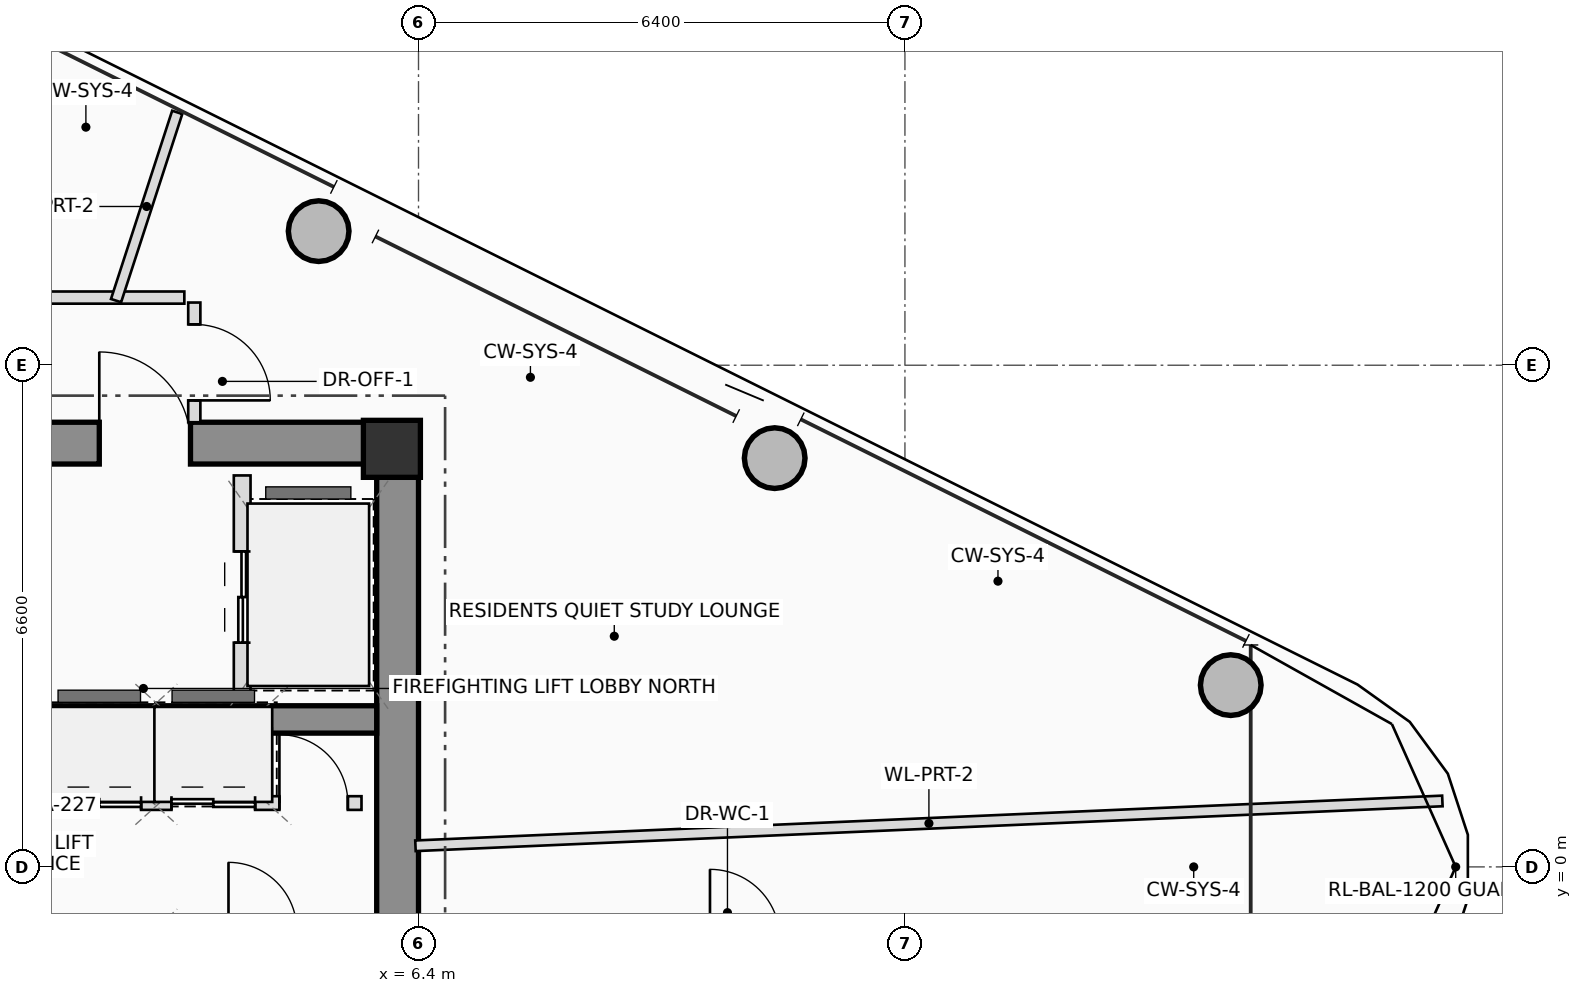
"""IFC4 building model, lengths in metres.
Left out: names, types, materials, properties, quantities, classifications, styles, units other than length and angle.
Written with IfcOpenShell. Run it as: python <this file> out.ifc"""

import sys

from ifc_helpers import new_model, si_unit, direction, frame, frame_2d, origin, origin_2d, place, context, subcontext, project, spatial, rectangle, hollow_circle, extrude, source, transform, mapped, element, fill, save


model = new_model("IFC4")
c1 = context("Model", 3, precision=1e-05, world=origin(), true_north=direction((0.0, 1.0)))
c2 = subcontext(c1, "Body", "Model", "MODEL_VIEW")
j1 = project(units=[si_unit("LENGTHUNIT", "METRE"), si_unit("PLANEANGLEUNIT", "RADIAN")], contexts=[c1])
p1 = place(None, origin())
s1 = spatial("IfcSite", under=j1, at=p1, CompositionType="ELEMENT")
p2 = place(p1, origin())
s2 = spatial("IfcBuilding", under=s1, at=p2, CompositionType="ELEMENT")
p3 = place(p2, frame((0.0, 0.0, 307.1)))
s3 = spatial("IfcBuildingStorey", under=s2, at=p3, CompositionType="ELEMENT", Elevation=307.1)
m1 = source(origin(), c2, "Body", "SweptSolid", [
    extrude(rectangle(XDim=0.75, YDim=0.75, at=origin_2d()), origin(), (0.0, 0.0, 1.0), 3.45),
])
p4 = place(p3, frame((6.05, 5.5, 0.0), z_axis=(0.0, 0.0, 1.0), x_axis=(1.0, 0.0, 0.0)))
e1 = element("IfcColumn", 1, at=p4, inside=s3, PredefinedType="COLUMN", context=c2, shape_type="MappedRepresentation", body=[
    mapped(m1, transform((0.0, 0.0, 0.0), scale=1.0)),
])
p5 = place(p3, frame((-6.4, 5.575, 0.0), z_axis=(0.0, 0.0, 1.0), x_axis=(1.0, 0.0, 0.0)))
e2 = element("IfcWall", 2, at=p5, inside=s3, PredefinedType="SHEAR", context=c2, shape_type="SweptSolid", body=[
    extrude(rectangle(XDim=12.8, YDim=0.55, at=frame_2d((6.4, 0.0))), origin(), (0.0, 0.0, 1.0), 3.45),
])
p6 = place(p5, frame((8.6, 0.0, 0.0)))
e3 = element("IfcOpeningElement", 3, at=p6, cuts=e2, PredefinedType="OPENING", context=c2, shape_type="SweptSolid", body=[
    extrude(rectangle(XDim=1.2, YDim=2.2, at=frame_2d((0.6, 1.1))), frame((0.0, 0.285, 0.0), z_axis=(0.0, -1.0, 0.0), x_axis=(1.0, 0.0, 0.0)), (0.0, 0.0, 1.0), 0.57),
])
p7 = place(p3, frame((6.125, -5.3, 0.0), z_axis=(0.0, 0.0, 1.0), x_axis=(0.0, 1.0, 0.0)))
e4 = element("IfcWall", 4, at=p7, inside=s3, PredefinedType="SHEAR", context=c2, shape_type="SweptSolid", body=[
    extrude(rectangle(XDim=10.6, YDim=0.55, at=frame_2d((5.3, 0.0))), origin(), (0.0, 0.0, 1.0), 3.45),
])
p8 = place(p3, frame((-5.85, 1.94, 0.0), z_axis=(0.0, 0.0, 1.0), x_axis=(1.0, 0.0, 0.0)))
e5 = element("IfcWall", 5, at=p8, inside=s3, PredefinedType="SHEAR", context=c2, shape_type="SweptSolid", body=[
    extrude(rectangle(XDim=11.7, YDim=0.36, at=frame_2d((5.85, 0.0))), origin(), (0.0, 0.0, 1.0), 3.45),
])
m2 = source(origin(), c2, "Body", "SweptSolid", [
    extrude(hollow_circle(Radius=0.4, WallThickness=0.028, at=origin_2d()), origin(), (0.0, 0.0, 1.0), 3.45),
])
for number, where, z_axis, x_axis in (
    (6, (17.087, 2.392, 0.0), (0.0, 0.0, 1.0), (1.0, 0.0, 0.0)),
    (7, (11.086, 5.378, 0.0), (0.0, 0.0, 1.0), (1.0, 0.0, 0.0)),
    (8, (5.086, 8.364, 0.0), (0.0, 0.0, 1.0), (1.0, 0.0, 0.0)),
):
    element("IfcColumn", number, at=place(p3, frame(where, z_axis=z_axis, x_axis=x_axis)), inside=s3, PredefinedType="COLUMN", context=c2, shape_type="MappedRepresentation", body=[
        mapped(m2, transform((0.0, 0.0, 0.0), scale=1.0)),
    ])
p9 = place(p3, frame((4.08, 2.2, 0.0), z_axis=(0.0, 0.0, 1.0), x_axis=(0.0, 1.0, 0.0)))
e9 = element("IfcWall", 9, at=p9, inside=s3, PredefinedType="PLUMBINGWALL", context=c2, shape_type="SweptSolid", body=[
    extrude(rectangle(XDim=2.95, YDim=0.22, at=frame_2d((1.475, 0.0))), origin(), (0.0, 0.0, 1.0), 3.25),
])
p10 = place(p9, frame((0.75, 0.0, 0.0)))
e10 = element("IfcOpeningElement", 10, at=p10, cuts=e9, PredefinedType="OPENING", context=c2, shape_type="SweptSolid", body=[
    extrude(rectangle(XDim=1.2, YDim=2.25, at=frame_2d((0.6, 1.125))), frame((0.0, 0.12, 0.0), z_axis=(0.0, -1.0, 0.0), x_axis=(1.0, 0.0, 0.0)), (0.0, 0.0, 1.0), 0.24),
])
for number, where, z_axis, x_axis in (
    (11, (3.02, 0.84, 0.0), (0.0, 0.0, 1.0), (0.0, 1.0, 0.0)),
    (12, (4.38, 0.84, 0.0), (0.0, 0.0, 1.0), (0.0, 1.0, 0.0)),
):
    element("IfcWall", number, at=place(p3, frame(where, z_axis=z_axis, x_axis=x_axis)), inside=s3, PredefinedType="PLUMBINGWALL", context=c2, shape_type="SweptSolid", body=[
        extrude(rectangle(XDim=0.98, YDim=0.18, at=frame_2d((0.49, 0.0))), origin(), (0.0, 0.0, 1.0), 3.25),
    ])
p11 = place(p3, frame((-5.68, 0.84, 0.0), z_axis=(0.0, 0.0, 1.0), x_axis=(1.0, 0.0, 0.0)))
e13 = element("IfcWall", 13, at=p11, inside=s3, PredefinedType="PLUMBINGWALL", context=c2, shape_type="SweptSolid", body=[
    extrude(rectangle(XDim=11.33, YDim=0.18, at=frame_2d((5.665, 0.0))), origin(), (0.0, 0.0, 1.0), 3.25),
])
p12 = place(p11, frame((3.13, 0.0, 0.0)))
e14 = element("IfcOpeningElement", 14, at=p12, cuts=e13, PredefinedType="OPENING", context=c2, shape_type="SweptSolid", body=[
    extrude(rectangle(XDim=0.9, YDim=2.05, at=frame_2d((0.45, 1.025))), frame((0.0, 0.1, 0.0), z_axis=(0.0, -1.0, 0.0), x_axis=(1.0, 0.0, 0.0)), (0.0, 0.0, 1.0), 0.2),
])
p13 = place(p11, frame((7.33, 0.0, 0.0)))
e15 = element("IfcOpeningElement", 15, at=p13, cuts=e13, PredefinedType="OPENING", context=c2, shape_type="SweptSolid", body=[
    extrude(rectangle(XDim=1.1, YDim=2.2, at=frame_2d((0.55, 1.1))), frame((0.0, 0.1, 0.0), z_axis=(0.0, -1.0, 0.0), x_axis=(1.0, 0.0, 0.0)), (0.0, 0.0, 1.0), 0.2),
])
p14 = place(p11, frame((8.83, 0.0, 0.0)))
e16 = element("IfcOpeningElement", 16, at=p14, cuts=e13, PredefinedType="OPENING", context=c2, shape_type="SweptSolid", body=[
    extrude(rectangle(XDim=1.1, YDim=2.2, at=frame_2d((0.55, 1.1))), frame((0.0, 0.1, 0.0), z_axis=(0.0, -1.0, 0.0), x_axis=(1.0, 0.0, 0.0)), (0.0, 0.0, 1.0), 0.2),
])
p15 = place(p11, frame((10.25, 0.0, 0.0)))
e17 = element("IfcOpeningElement", 17, at=p15, cuts=e13, PredefinedType="OPENING", context=c2, shape_type="SweptSolid", body=[
    extrude(rectangle(XDim=0.9, YDim=2.05, at=frame_2d((0.45, 1.025))), frame((0.0, 0.1, 0.0), z_axis=(0.0, -1.0, 0.0), x_axis=(1.0, 0.0, 0.0)), (0.0, 0.0, 1.0), 0.2),
])
p16 = place(p3, frame((-6.36, 7.49, 0.0), z_axis=(0.0, 0.0, 1.0), x_axis=(1.0, 0.0, 0.0)))
e18 = element("IfcWall", 18, at=p16, inside=s3, PredefinedType="PARTITIONING", context=c2, shape_type="SweptSolid", body=[
    extrude(rectangle(XDim=9.679, YDim=0.16, at=frame_2d((4.84, 0.0))), origin(), (0.0, 0.0, 1.0), 2.655),
])
p17 = place(p3, frame((3.45, 7.425, 0.0), z_axis=(0.0, 0.0, 1.0), x_axis=(0.0, -1.0, 0.0)))
e19 = element("IfcWall", 19, at=p17, inside=s3, PredefinedType="PARTITIONING", context=c2, shape_type="SweptSolid", body=[
    extrude(rectangle(XDim=1.575, YDim=0.16, at=frame_2d((0.787, 0.0))), origin(), (0.0, 0.0, 1.0), 2.855),
])
p18 = place(p17, frame((0.287, 0.0, 0.0)))
e20 = element("IfcOpeningElement", 20, at=p18, cuts=e19, PredefinedType="OPENING", context=c2, shape_type="SweptSolid", body=[
    extrude(rectangle(XDim=1.0, YDim=2.25, at=frame_2d((0.5, 1.125))), frame((0.0, 0.09, 0.0), z_axis=(0.0, -1.0, 0.0), x_axis=(1.0, 0.0, 0.0)), (0.0, 0.0, 1.0), 0.18),
])
p19 = place(p3, frame((6.36, 0.278, 0.0), z_axis=(0.0, 0.0, 1.0), x_axis=(0.999047623791, 0.043633076864, 0.0)))
e21 = element("IfcWall", 21, at=p19, inside=s3, PredefinedType="PARTITIONING", context=c2, shape_type="SweptSolid", body=[
    extrude(rectangle(XDim=13.524, YDim=0.14, at=frame_2d((6.762, 0.0))), origin(), (0.0, 0.0, 1.0), 2.815),
])
p20 = place(p3, frame((2.421, 7.45, 0.0), z_axis=(0.0, 0.0, 1.0), x_axis=(0.309047920595, 0.951046467201, 0.0)))
e22 = element("IfcWall", 22, at=p20, inside=s3, PredefinedType="PARTITIONING", context=c2, shape_type="SweptSolid", body=[
    extrude(rectangle(XDim=2.604, YDim=0.14, at=frame_2d((1.302, 0.0))), origin(), (0.0, 0.0, 1.0), 2.815),
])
p21 = place(p6, origin())
e23 = element("IfcDoor", 23, at=p21, inside=s3, OperationType="SINGLE_SWING_LEFT", PredefinedType="DOOR", context=c2, shape_type="SweptSolid", body=[
    extrude(rectangle(XDim=1.2, YDim=2.2, at=frame_2d((0.6, 1.1))), frame((0.0, 0.025, 0.0), z_axis=(0.0, -1.0, 0.0), x_axis=(1.0, 0.0, 0.0)), (0.0, 0.0, 1.0), 0.05),
])
fill(e3, e23)
p22 = place(p10, origin())
e24 = element("IfcDoor", 24, at=p22, inside=s3, OperationType="DOUBLE_DOOR_SLIDING", PredefinedType="DOOR", context=c2, shape_type="SweptSolid", body=[
    extrude(rectangle(XDim=1.2, YDim=2.25, at=frame_2d((0.6, 1.125))), frame((0.0, 0.025, 0.0), z_axis=(0.0, -1.0, 0.0), x_axis=(1.0, 0.0, 0.0)), (0.0, 0.0, 1.0), 0.05),
])
fill(e10, e24)
p23 = place(p13, origin())
e25 = element("IfcDoor", 25, at=p23, inside=s3, OperationType="DOUBLE_DOOR_SLIDING", PredefinedType="DOOR", context=c2, shape_type="SweptSolid", body=[
    extrude(rectangle(XDim=1.1, YDim=2.2, at=frame_2d((0.55, 1.1))), frame((0.0, 0.025, 0.0), z_axis=(0.0, -1.0, 0.0), x_axis=(1.0, 0.0, 0.0)), (0.0, 0.0, 1.0), 0.05),
])
fill(e15, e25)
p24 = place(p14, origin())
e26 = element("IfcDoor", 26, at=p24, inside=s3, OperationType="DOUBLE_DOOR_SLIDING", PredefinedType="DOOR", context=c2, shape_type="SweptSolid", body=[
    extrude(rectangle(XDim=1.1, YDim=2.2, at=frame_2d((0.55, 1.1))), frame((0.0, 0.025, 0.0), z_axis=(0.0, -1.0, 0.0), x_axis=(1.0, 0.0, 0.0)), (0.0, 0.0, 1.0), 0.05),
])
fill(e16, e26)
p25 = place(p15, origin())
e27 = element("IfcDoor", 27, at=p25, inside=s3, OperationType="SINGLE_SWING_LEFT", PredefinedType="DOOR", context=c2, shape_type="SweptSolid", body=[
    extrude(rectangle(XDim=0.9, YDim=2.05, at=frame_2d((0.45, 1.025))), frame((0.0, 0.025, 0.0), z_axis=(0.0, -1.0, 0.0), x_axis=(1.0, 0.0, 0.0)), (0.0, 0.0, 1.0), 0.05),
])
fill(e17, e27)
p26 = place(p18, origin())
e28 = element("IfcDoor", 28, at=p26, inside=s3, OperationType="SINGLE_SWING_RIGHT", PredefinedType="DOOR", context=c2, shape_type="SweptSolid", body=[
    extrude(rectangle(XDim=1.0, YDim=2.25, at=frame_2d((0.5, 1.125))), frame((0.0, 0.025, 0.0), z_axis=(0.0, -1.0, 0.0), x_axis=(1.0, 0.0, 0.0)), (0.0, 0.0, 1.0), 0.05),
])
fill(e20, e28)
save(model, sys.argv[1])
